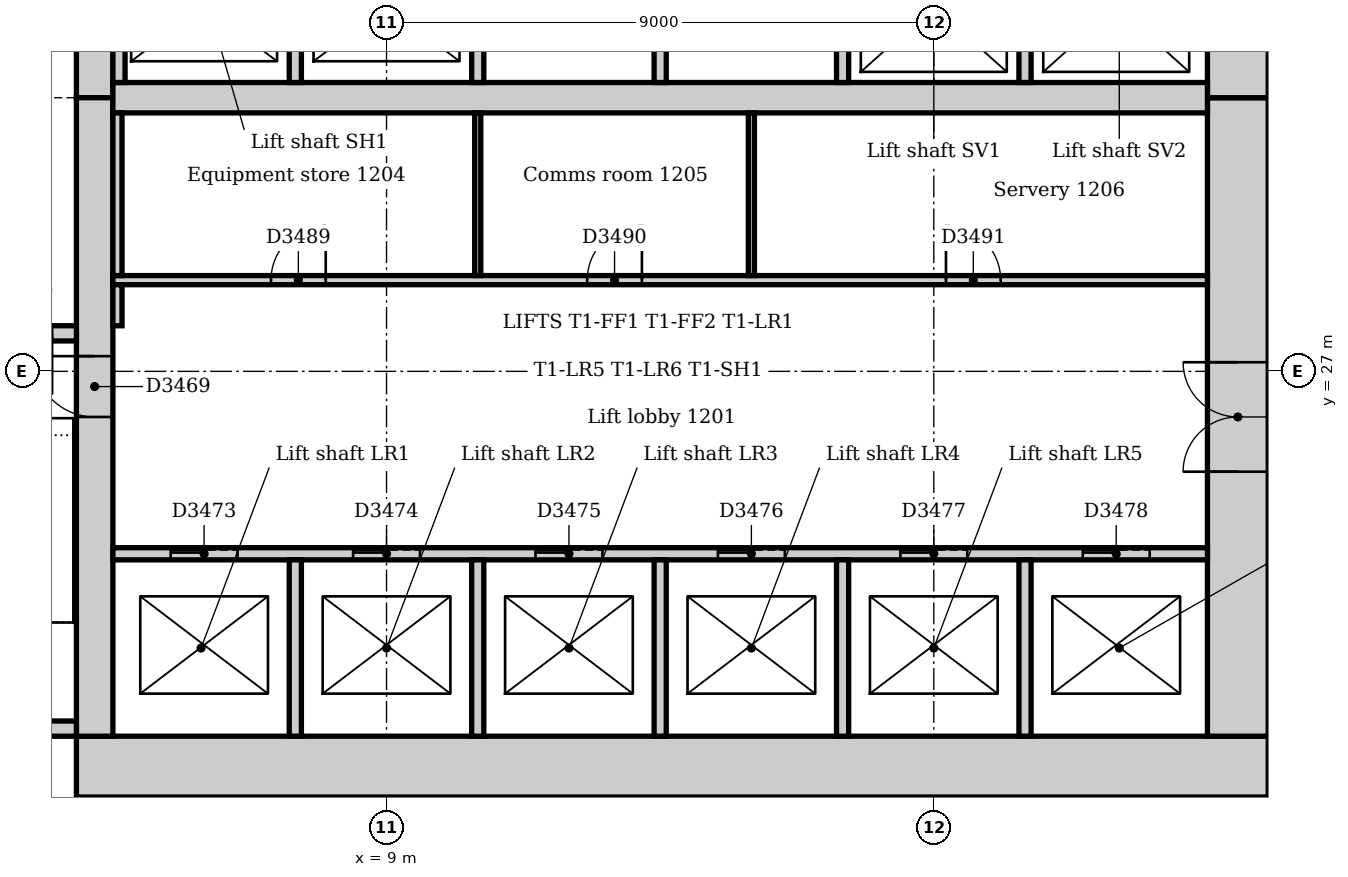
"""IFC4 building model, lengths in metres.
Left out: names, types, materials, properties, quantities, classifications, styles, units other than length and angle.
Written with IfcOpenShell. Run it as: python <this file> out.ifc"""

import sys

from ifc_helpers import new_model, si_unit, direction, frame, frame_2d, origin, place, context, subcontext, project, spatial, rectangle, extrude, element, fill, save


model = new_model("IFC4")
c1 = context("Model", 3, precision=1e-05, world=origin(), true_north=direction((0.0, 1.0)))
c2 = subcontext(c1, "Body", "Model", "MODEL_VIEW")
j1 = project(units=[si_unit("LENGTHUNIT", "METRE"), si_unit("PLANEANGLEUNIT", "RADIAN")], contexts=[c1])
p1 = place(None, origin())
s1 = spatial("IfcSite", under=j1, at=p1, CompositionType="ELEMENT")
p2 = place(p1, origin())
s2 = spatial("IfcBuilding", under=s1, at=p2, CompositionType="ELEMENT")
p3 = place(p2, frame((0.0, 0.0, 55.0)))
s3 = spatial("IfcBuildingStorey", under=s2, at=p3, CompositionType="ELEMENT", Elevation=55.0)
p4 = place(p3, frame((3.9, 20.5, 0.0), z_axis=(0.0, 0.0, 1.0), x_axis=(1.0, 0.0, 0.0)))
e1 = element("IfcWall", 1, at=p4, inside=s3, PredefinedType="SOLIDWALL", context=c2, shape_type="SweptSolid", body=[
    extrude(rectangle(XDim=19.6, YDim=1.0, at=frame_2d((9.8, 0.0))), origin(), (0.0, 0.0, 1.0), 4.0),
])
p5 = place(p3, frame((23.0, 21.0, 0.0), z_axis=(0.0, 0.0, 1.0), x_axis=(0.0, 1.0, 0.0)))
e2 = element("IfcWall", 2, at=p5, inside=s3, PredefinedType="SOLIDWALL", context=c2, shape_type="SweptSolid", body=[
    extrude(rectangle(XDim=10.5, YDim=1.0, at=frame_2d((5.25, 0.0))), origin(), (0.0, 0.0, 1.0), 4.0),
])
p6 = place(p5, frame((4.35, 0.0, 0.0)))
e3 = element("IfcOpeningElement", 3, at=p6, cuts=e2, PredefinedType="OPENING", context=c2, shape_type="SweptSolid", body=[
    extrude(rectangle(XDim=1.8, YDim=2.1, at=frame_2d((0.9, 1.05))), frame((0.0, 0.51, 0.0), z_axis=(0.0, -1.0, 0.0), x_axis=(1.0, 0.0, 0.0)), (0.0, 0.0, 1.0), 1.02),
])
p7 = place(p3, frame((23.0, 31.5, 0.0), z_axis=(0.0, 0.0, 1.0), x_axis=(0.0, 1.0, 0.0)))
e4 = element("IfcWall", 4, at=p7, inside=s3, PredefinedType="SOLIDWALL", context=c2, shape_type="SweptSolid", body=[
    extrude(rectangle(XDim=10.5, YDim=1.0, at=frame_2d((5.25, 0.0))), origin(), (0.0, 0.0, 1.0), 4.0),
])
p8 = place(p7, frame((3.15, 0.0, 0.0)))
e5 = element("IfcOpeningElement", 5, at=p8, cuts=e4, PredefinedType="OPENING", context=c2, shape_type="SweptSolid", body=[
    extrude(rectangle(XDim=1.0, YDim=2.1, at=frame_2d((0.5, 1.05))), frame((0.0, 0.51, 0.0), z_axis=(0.0, -1.0, 0.0), x_axis=(1.0, 0.0, 0.0)), (0.0, 0.0, 1.0), 1.02),
])
p9 = place(p7, frame((5.2, 0.0, 0.0)))
e6 = element("IfcOpeningElement", 6, at=p9, cuts=e4, PredefinedType="OPENING", context=c2, shape_type="SweptSolid", body=[
    extrude(rectangle(XDim=1.0, YDim=2.1, at=frame_2d((0.5, 1.05))), frame((0.0, 0.51, 0.0), z_axis=(0.0, -1.0, 0.0), x_axis=(1.0, 0.0, 0.0)), (0.0, 0.0, 1.0), 1.02),
])
p10 = place(p3, frame((4.2, 42.0, 0.0), z_axis=(0.0, 0.0, 1.0), x_axis=(0.0, -1.0, 0.0)))
e7 = element("IfcWall", 7, at=p10, inside=s3, PredefinedType="SOLIDWALL", context=c2, shape_type="SweptSolid", body=[
    extrude(rectangle(XDim=10.5, YDim=0.6, at=frame_2d((5.25, 0.0))), origin(), (0.0, 0.0, 1.0), 4.0),
])
p11 = place(p10, frame((5.3, 0.0, 0.0)))
e8 = element("IfcOpeningElement", 8, at=p11, cuts=e7, PredefinedType="OPENING", context=c2, shape_type="SweptSolid", body=[
    extrude(rectangle(XDim=1.0, YDim=2.1, at=frame_2d((0.5, 1.05))), frame((0.0, 0.31, 0.0), z_axis=(0.0, -1.0, 0.0), x_axis=(1.0, 0.0, 0.0)), (0.0, 0.0, 1.0), 0.62),
])
p12 = place(p3, frame((4.2, 31.5, 0.0), z_axis=(0.0, 0.0, 1.0), x_axis=(0.0, -1.0, 0.0)))
e9 = element("IfcWall", 9, at=p12, inside=s3, PredefinedType="SOLIDWALL", context=c2, shape_type="SweptSolid", body=[
    extrude(rectangle(XDim=10.5, YDim=0.6, at=frame_2d((5.25, 0.0))), origin(), (0.0, 0.0, 1.0), 4.0),
])
p13 = place(p12, frame((4.25, 0.0, 0.0)))
e10 = element("IfcOpeningElement", 10, at=p13, cuts=e9, PredefinedType="OPENING", context=c2, shape_type="SweptSolid", body=[
    extrude(rectangle(XDim=1.0, YDim=2.1, at=frame_2d((0.5, 1.05))), frame((0.0, 0.31, 0.0), z_axis=(0.0, -1.0, 0.0), x_axis=(1.0, 0.0, 0.0)), (0.0, 0.0, 1.0), 0.62),
])
p14 = place(p3, frame((4.5, 31.5, 0.0), z_axis=(0.0, 0.0, 1.0), x_axis=(1.0, 0.0, 0.0)))
e11 = element("IfcWall", 11, at=p14, inside=s3, PredefinedType="SOLIDWALL", context=c2, shape_type="SweptSolid", body=[
    extrude(rectangle(XDim=18.0, YDim=0.5, at=frame_2d((9.0, 0.0))), origin(), (0.0, 0.0, 1.0), 4.0),
])
p15 = place(p3, frame((0.36, 21.125, 0.0), z_axis=(0.0, 0.0, 1.0), x_axis=(1.0, 0.0, 0.0)))
e12 = element("IfcWall", 12, at=p15, inside=s3, PredefinedType="SOLIDWALL", context=c2, shape_type="SweptSolid", body=[
    extrude(rectangle(XDim=3.54, YDim=0.25, at=frame_2d((1.77, 0.0))), origin(), (0.0, 0.0, 1.0), 4.0),
])
p16 = place(p3, frame((3.9, 27.625, 0.0), z_axis=(0.0, 0.0, 1.0), x_axis=(-1.0, 0.0, 0.0)))
e13 = element("IfcWall", 13, at=p16, inside=s3, PredefinedType="SOLIDWALL", context=c2, shape_type="SweptSolid", body=[
    extrude(rectangle(XDim=3.54, YDim=0.25, at=frame_2d((1.77, 0.0))), origin(), (0.0, 0.0, 1.0), 4.0),
])
p17 = place(p16, frame((0.4, 0.0, 0.0)))
e14 = element("IfcOpeningElement", 14, at=p17, cuts=e13, PredefinedType="OPENING", context=c2, shape_type="SweptSolid", body=[
    extrude(rectangle(XDim=1.0, YDim=2.1, at=frame_2d((0.5, 1.05))), frame((0.0, 0.135, 0.0), z_axis=(0.0, -1.0, 0.0), x_axis=(1.0, 0.0, 0.0)), (0.0, 0.0, 1.0), 0.27),
])
p18 = place(p3, frame((4.5, 24.0, 0.0), z_axis=(0.0, 0.0, 1.0), x_axis=(1.0, 0.0, 0.0)))
e15 = element("IfcWall", 15, at=p18, inside=s3, PredefinedType="PARTITIONING", context=c2, shape_type="SweptSolid", body=[
    extrude(rectangle(XDim=18.0, YDim=0.2, at=frame_2d((9.0, 0.0))), origin(), (0.0, 0.0, 1.0), 3.85),
])
p19 = place(p18, frame((0.95, 0.0, 0.0)))
e16 = element("IfcOpeningElement", 16, at=p19, cuts=e15, PredefinedType="OPENING", context=c2, shape_type="SweptSolid", body=[
    extrude(rectangle(XDim=1.1, YDim=2.1, at=frame_2d((0.55, 1.05))), frame((0.0, 0.11, 0.0), z_axis=(0.0, -1.0, 0.0), x_axis=(1.0, 0.0, 0.0)), (0.0, 0.0, 1.0), 0.22),
])
p20 = place(p18, frame((3.95, 0.0, 0.0)))
e17 = element("IfcOpeningElement", 17, at=p20, cuts=e15, PredefinedType="OPENING", context=c2, shape_type="SweptSolid", body=[
    extrude(rectangle(XDim=1.1, YDim=2.1, at=frame_2d((0.55, 1.05))), frame((0.0, 0.11, 0.0), z_axis=(0.0, -1.0, 0.0), x_axis=(1.0, 0.0, 0.0)), (0.0, 0.0, 1.0), 0.22),
])
p21 = place(p18, frame((6.95, 0.0, 0.0)))
e18 = element("IfcOpeningElement", 18, at=p21, cuts=e15, PredefinedType="OPENING", context=c2, shape_type="SweptSolid", body=[
    extrude(rectangle(XDim=1.1, YDim=2.1, at=frame_2d((0.55, 1.05))), frame((0.0, 0.11, 0.0), z_axis=(0.0, -1.0, 0.0), x_axis=(1.0, 0.0, 0.0)), (0.0, 0.0, 1.0), 0.22),
])
p22 = place(p18, frame((9.95, 0.0, 0.0)))
e19 = element("IfcOpeningElement", 19, at=p22, cuts=e15, PredefinedType="OPENING", context=c2, shape_type="SweptSolid", body=[
    extrude(rectangle(XDim=1.1, YDim=2.1, at=frame_2d((0.55, 1.05))), frame((0.0, 0.11, 0.0), z_axis=(0.0, -1.0, 0.0), x_axis=(1.0, 0.0, 0.0)), (0.0, 0.0, 1.0), 0.22),
])
p23 = place(p18, frame((12.95, 0.0, 0.0)))
e20 = element("IfcOpeningElement", 20, at=p23, cuts=e15, PredefinedType="OPENING", context=c2, shape_type="SweptSolid", body=[
    extrude(rectangle(XDim=1.1, YDim=2.1, at=frame_2d((0.55, 1.05))), frame((0.0, 0.11, 0.0), z_axis=(0.0, -1.0, 0.0), x_axis=(1.0, 0.0, 0.0)), (0.0, 0.0, 1.0), 0.22),
])
p24 = place(p18, frame((15.95, 0.0, 0.0)))
e21 = element("IfcOpeningElement", 21, at=p24, cuts=e15, PredefinedType="OPENING", context=c2, shape_type="SweptSolid", body=[
    extrude(rectangle(XDim=1.1, YDim=2.1, at=frame_2d((0.55, 1.05))), frame((0.0, 0.11, 0.0), z_axis=(0.0, -1.0, 0.0), x_axis=(1.0, 0.0, 0.0)), (0.0, 0.0, 1.0), 0.22),
])
p25 = place(p3, frame((4.6, 31.75, 0.0), z_axis=(0.0, 0.0, 1.0), x_axis=(0.0, 1.0, 0.0)))
e22 = element("IfcWall", 22, at=p25, inside=s3, PredefinedType="PARTITIONING", context=c2, shape_type="SweptSolid", body=[
    extrude(rectangle(XDim=2.65, YDim=0.2, at=frame_2d((1.325, 0.0))), origin(), (0.0, 0.0, 1.0), 3.85),
])
p26 = place(p3, frame((7.5, 21.0, 0.0), z_axis=(0.0, 0.0, 1.0), x_axis=(0.0, 1.0, 0.0)))
e23 = element("IfcWall", 23, at=p26, inside=s3, PredefinedType="PARTITIONING", context=c2, shape_type="SweptSolid", body=[
    extrude(rectangle(XDim=2.9, YDim=0.2, at=frame_2d((1.45, 0.0))), origin(), (0.0, 0.0, 1.0), 3.85),
])
p27 = place(p3, frame((7.5, 31.75, 0.0), z_axis=(0.0, 0.0, 1.0), x_axis=(0.0, 1.0, 0.0)))
e24 = element("IfcWall", 24, at=p27, inside=s3, PredefinedType="PARTITIONING", context=c2, shape_type="SweptSolid", body=[
    extrude(rectangle(XDim=2.65, YDim=0.2, at=frame_2d((1.325, 0.0))), origin(), (0.0, 0.0, 1.0), 3.85),
])
p28 = place(p3, frame((10.5, 21.0, 0.0), z_axis=(0.0, 0.0, 1.0), x_axis=(0.0, 1.0, 0.0)))
e25 = element("IfcWall", 25, at=p28, inside=s3, PredefinedType="PARTITIONING", context=c2, shape_type="SweptSolid", body=[
    extrude(rectangle(XDim=2.9, YDim=0.2, at=frame_2d((1.45, 0.0))), origin(), (0.0, 0.0, 1.0), 3.85),
])
p29 = place(p3, frame((10.5, 31.75, 0.0), z_axis=(0.0, 0.0, 1.0), x_axis=(0.0, 1.0, 0.0)))
e26 = element("IfcWall", 26, at=p29, inside=s3, PredefinedType="PARTITIONING", context=c2, shape_type="SweptSolid", body=[
    extrude(rectangle(XDim=2.65, YDim=0.2, at=frame_2d((1.325, 0.0))), origin(), (0.0, 0.0, 1.0), 3.85),
])
p30 = place(p3, frame((13.5, 21.0, 0.0), z_axis=(0.0, 0.0, 1.0), x_axis=(0.0, 1.0, 0.0)))
e27 = element("IfcWall", 27, at=p30, inside=s3, PredefinedType="PARTITIONING", context=c2, shape_type="SweptSolid", body=[
    extrude(rectangle(XDim=2.9, YDim=0.2, at=frame_2d((1.45, 0.0))), origin(), (0.0, 0.0, 1.0), 3.85),
])
p31 = place(p3, frame((13.5, 31.75, 0.0), z_axis=(0.0, 0.0, 1.0), x_axis=(0.0, 1.0, 0.0)))
e28 = element("IfcWall", 28, at=p31, inside=s3, PredefinedType="PARTITIONING", context=c2, shape_type="SweptSolid", body=[
    extrude(rectangle(XDim=2.65, YDim=0.2, at=frame_2d((1.325, 0.0))), origin(), (0.0, 0.0, 1.0), 3.85),
])
p32 = place(p3, frame((16.5, 21.0, 0.0), z_axis=(0.0, 0.0, 1.0), x_axis=(0.0, 1.0, 0.0)))
e29 = element("IfcWall", 29, at=p32, inside=s3, PredefinedType="PARTITIONING", context=c2, shape_type="SweptSolid", body=[
    extrude(rectangle(XDim=2.9, YDim=0.2, at=frame_2d((1.45, 0.0))), origin(), (0.0, 0.0, 1.0), 3.85),
])
p33 = place(p3, frame((16.5, 31.75, 0.0), z_axis=(0.0, 0.0, 1.0), x_axis=(0.0, 1.0, 0.0)))
e30 = element("IfcWall", 30, at=p33, inside=s3, PredefinedType="PARTITIONING", context=c2, shape_type="SweptSolid", body=[
    extrude(rectangle(XDim=2.65, YDim=0.2, at=frame_2d((1.325, 0.0))), origin(), (0.0, 0.0, 1.0), 3.85),
])
p34 = place(p3, frame((19.5, 21.0, 0.0), z_axis=(0.0, 0.0, 1.0), x_axis=(0.0, 1.0, 0.0)))
e31 = element("IfcWall", 31, at=p34, inside=s3, PredefinedType="PARTITIONING", context=c2, shape_type="SweptSolid", body=[
    extrude(rectangle(XDim=2.9, YDim=0.2, at=frame_2d((1.45, 0.0))), origin(), (0.0, 0.0, 1.0), 3.85),
])
p35 = place(p3, frame((19.5, 31.75, 0.0), z_axis=(0.0, 0.0, 1.0), x_axis=(0.0, 1.0, 0.0)))
e32 = element("IfcWall", 32, at=p35, inside=s3, PredefinedType="PARTITIONING", context=c2, shape_type="SweptSolid", body=[
    extrude(rectangle(XDim=2.65, YDim=0.2, at=frame_2d((1.325, 0.0))), origin(), (0.0, 0.0, 1.0), 3.85),
])
p36 = place(p3, frame((4.5, 28.5, 0.0), z_axis=(0.0, 0.0, 1.0), x_axis=(1.0, 0.0, 0.0)))
e33 = element("IfcWall", 33, at=p36, inside=s3, PredefinedType="PARTITIONING", context=c2, shape_type="SweptSolid", body=[
    extrude(rectangle(XDim=18.0, YDim=0.15, at=frame_2d((9.0, 0.0))), origin(), (0.0, 0.0, 1.0), 3.85),
])
p37 = place(p36, frame((2.6, 0.0, 0.0)))
e34 = element("IfcOpeningElement", 34, at=p37, cuts=e33, PredefinedType="OPENING", context=c2, shape_type="SweptSolid", body=[
    extrude(rectangle(XDim=0.9, YDim=2.1, at=frame_2d((0.45, 1.05))), frame((0.0, 0.085, 0.0), z_axis=(0.0, -1.0, 0.0), x_axis=(1.0, 0.0, 0.0)), (0.0, 0.0, 1.0), 0.17),
])
p38 = place(p36, frame((7.8, 0.0, 0.0)))
e35 = element("IfcOpeningElement", 35, at=p38, cuts=e33, PredefinedType="OPENING", context=c2, shape_type="SweptSolid", body=[
    extrude(rectangle(XDim=0.9, YDim=2.1, at=frame_2d((0.45, 1.05))), frame((0.0, 0.085, 0.0), z_axis=(0.0, -1.0, 0.0), x_axis=(1.0, 0.0, 0.0)), (0.0, 0.0, 1.0), 0.17),
])
p39 = place(p36, frame((13.7, 0.0, 0.0)))
e36 = element("IfcOpeningElement", 36, at=p39, cuts=e33, PredefinedType="OPENING", context=c2, shape_type="SweptSolid", body=[
    extrude(rectangle(XDim=0.9, YDim=2.1, at=frame_2d((0.45, 1.05))), frame((0.0, 0.085, 0.0), z_axis=(0.0, -1.0, 0.0), x_axis=(1.0, 0.0, 0.0)), (0.0, 0.0, 1.0), 0.17),
])
p40 = place(p3, frame((4.575, 27.75, 0.0), z_axis=(0.0, 0.0, 1.0), x_axis=(0.0, 1.0, 0.0)))
e37 = element("IfcWall", 37, at=p40, inside=s3, PredefinedType="PARTITIONING", context=c2, shape_type="SweptSolid", body=[
    extrude(rectangle(XDim=0.675, YDim=0.15, at=frame_2d((0.338, 0.0))), origin(), (0.0, 0.0, 1.0), 3.85),
])
p41 = place(p3, frame((4.575, 28.575, 0.0), z_axis=(0.0, 0.0, 1.0), x_axis=(0.0, 1.0, 0.0)))
e38 = element("IfcWall", 38, at=p41, inside=s3, PredefinedType="PARTITIONING", context=c2, shape_type="SweptSolid", body=[
    extrude(rectangle(XDim=2.675, YDim=0.15, at=frame_2d((1.337, 0.0))), origin(), (0.0, 0.0, 1.0), 3.85),
])
for number, where, z_axis, x_axis in (
    (39, (10.5, 28.575, 0.0), (0.0, 0.0, 1.0), (0.0, 1.0, 0.0)),
    (40, (15.0, 28.575, 0.0), (0.0, 0.0, 1.0), (0.0, 1.0, 0.0)),
):
    element("IfcWall", number, at=place(p3, frame(where, z_axis=z_axis, x_axis=x_axis)), inside=s3, PredefinedType="PARTITIONING", context=c2, shape_type="SweptSolid", body=[
        extrude(rectangle(XDim=2.675, YDim=0.1, at=frame_2d((1.337, 0.0))), origin(), (0.0, 0.0, 1.0), 3.85),
    ])
p42 = place(p13, frame((1.0, 0.0, 0.0), z_axis=(0.0, 0.0, 1.0), x_axis=(-1.0, 0.0, 0.0)))
e41 = element("IfcDoor", 41, at=p42, inside=s3, OperationType="SINGLE_SWING_RIGHT", PredefinedType="DOOR", context=c2, shape_type="SweptSolid", body=[
    extrude(rectangle(XDim=1.0, YDim=2.1, at=frame_2d((0.5, 1.05))), frame((0.0, 0.025, 0.0), z_axis=(0.0, -1.0, 0.0), x_axis=(1.0, 0.0, 0.0)), (0.0, 0.0, 1.0), 0.05),
])
fill(e10, e41)
p43 = place(p19, origin())
e42 = element("IfcDoor", 42, at=p43, inside=s3, OperationType="SLIDING_TO_LEFT", PredefinedType="DOOR", context=c2, shape_type="SweptSolid", body=[
    extrude(rectangle(XDim=1.1, YDim=2.1, at=frame_2d((0.55, 1.05))), frame((0.0, 0.025, 0.0), z_axis=(0.0, -1.0, 0.0), x_axis=(1.0, 0.0, 0.0)), (0.0, 0.0, 1.0), 0.05),
])
fill(e16, e42)
p44 = place(p20, origin())
e43 = element("IfcDoor", 43, at=p44, inside=s3, OperationType="SLIDING_TO_LEFT", PredefinedType="DOOR", context=c2, shape_type="SweptSolid", body=[
    extrude(rectangle(XDim=1.1, YDim=2.1, at=frame_2d((0.55, 1.05))), frame((0.0, 0.025, 0.0), z_axis=(0.0, -1.0, 0.0), x_axis=(1.0, 0.0, 0.0)), (0.0, 0.0, 1.0), 0.05),
])
fill(e17, e43)
p45 = place(p21, origin())
e44 = element("IfcDoor", 44, at=p45, inside=s3, OperationType="SLIDING_TO_LEFT", PredefinedType="DOOR", context=c2, shape_type="SweptSolid", body=[
    extrude(rectangle(XDim=1.1, YDim=2.1, at=frame_2d((0.55, 1.05))), frame((0.0, 0.025, 0.0), z_axis=(0.0, -1.0, 0.0), x_axis=(1.0, 0.0, 0.0)), (0.0, 0.0, 1.0), 0.05),
])
fill(e18, e44)
p46 = place(p22, origin())
e45 = element("IfcDoor", 45, at=p46, inside=s3, OperationType="SLIDING_TO_LEFT", PredefinedType="DOOR", context=c2, shape_type="SweptSolid", body=[
    extrude(rectangle(XDim=1.1, YDim=2.1, at=frame_2d((0.55, 1.05))), frame((0.0, 0.025, 0.0), z_axis=(0.0, -1.0, 0.0), x_axis=(1.0, 0.0, 0.0)), (0.0, 0.0, 1.0), 0.05),
])
fill(e19, e45)
p47 = place(p23, origin())
e46 = element("IfcDoor", 46, at=p47, inside=s3, OperationType="SLIDING_TO_LEFT", PredefinedType="DOOR", context=c2, shape_type="SweptSolid", body=[
    extrude(rectangle(XDim=1.1, YDim=2.1, at=frame_2d((0.55, 1.05))), frame((0.0, 0.025, 0.0), z_axis=(0.0, -1.0, 0.0), x_axis=(1.0, 0.0, 0.0)), (0.0, 0.0, 1.0), 0.05),
])
fill(e20, e46)
p48 = place(p24, origin())
e47 = element("IfcDoor", 47, at=p48, inside=s3, OperationType="SLIDING_TO_LEFT", PredefinedType="DOOR", context=c2, shape_type="SweptSolid", body=[
    extrude(rectangle(XDim=1.1, YDim=2.1, at=frame_2d((0.55, 1.05))), frame((0.0, 0.025, 0.0), z_axis=(0.0, -1.0, 0.0), x_axis=(1.0, 0.0, 0.0)), (0.0, 0.0, 1.0), 0.05),
])
fill(e21, e47)
p49 = place(p6, origin())
e48 = element("IfcDoor", 48, at=p49, inside=s3, OperationType="DOUBLE_DOOR_DOUBLE_SWING", PredefinedType="DOOR", context=c2, shape_type="SweptSolid", body=[
    extrude(rectangle(XDim=1.8, YDim=2.1, at=frame_2d((0.9, 1.05))), frame((0.0, 0.025, 0.0), z_axis=(0.0, -1.0, 0.0), x_axis=(1.0, 0.0, 0.0)), (0.0, 0.0, 1.0), 0.05),
])
fill(e3, e48)
p50 = place(p37, origin())
e49 = element("IfcDoor", 49, at=p50, inside=s3, OperationType="SINGLE_SWING_RIGHT", PredefinedType="DOOR", context=c2, shape_type="SweptSolid", body=[
    extrude(rectangle(XDim=0.9, YDim=2.1, at=frame_2d((0.45, 1.05))), frame((0.0, 0.025, 0.0), z_axis=(0.0, -1.0, 0.0), x_axis=(1.0, 0.0, 0.0)), (0.0, 0.0, 1.0), 0.05),
])
fill(e34, e49)
p51 = place(p38, origin())
e50 = element("IfcDoor", 50, at=p51, inside=s3, OperationType="SINGLE_SWING_RIGHT", PredefinedType="DOOR", context=c2, shape_type="SweptSolid", body=[
    extrude(rectangle(XDim=0.9, YDim=2.1, at=frame_2d((0.45, 1.05))), frame((0.0, 0.025, 0.0), z_axis=(0.0, -1.0, 0.0), x_axis=(1.0, 0.0, 0.0)), (0.0, 0.0, 1.0), 0.05),
])
fill(e35, e50)
p52 = place(p39, origin())
e51 = element("IfcDoor", 51, at=p52, inside=s3, OperationType="SINGLE_SWING_LEFT", PredefinedType="DOOR", context=c2, shape_type="SweptSolid", body=[
    extrude(rectangle(XDim=0.9, YDim=2.1, at=frame_2d((0.45, 1.05))), frame((0.0, 0.025, 0.0), z_axis=(0.0, -1.0, 0.0), x_axis=(1.0, 0.0, 0.0)), (0.0, 0.0, 1.0), 0.05),
])
fill(e36, e51)
save(model, sys.argv[1])
